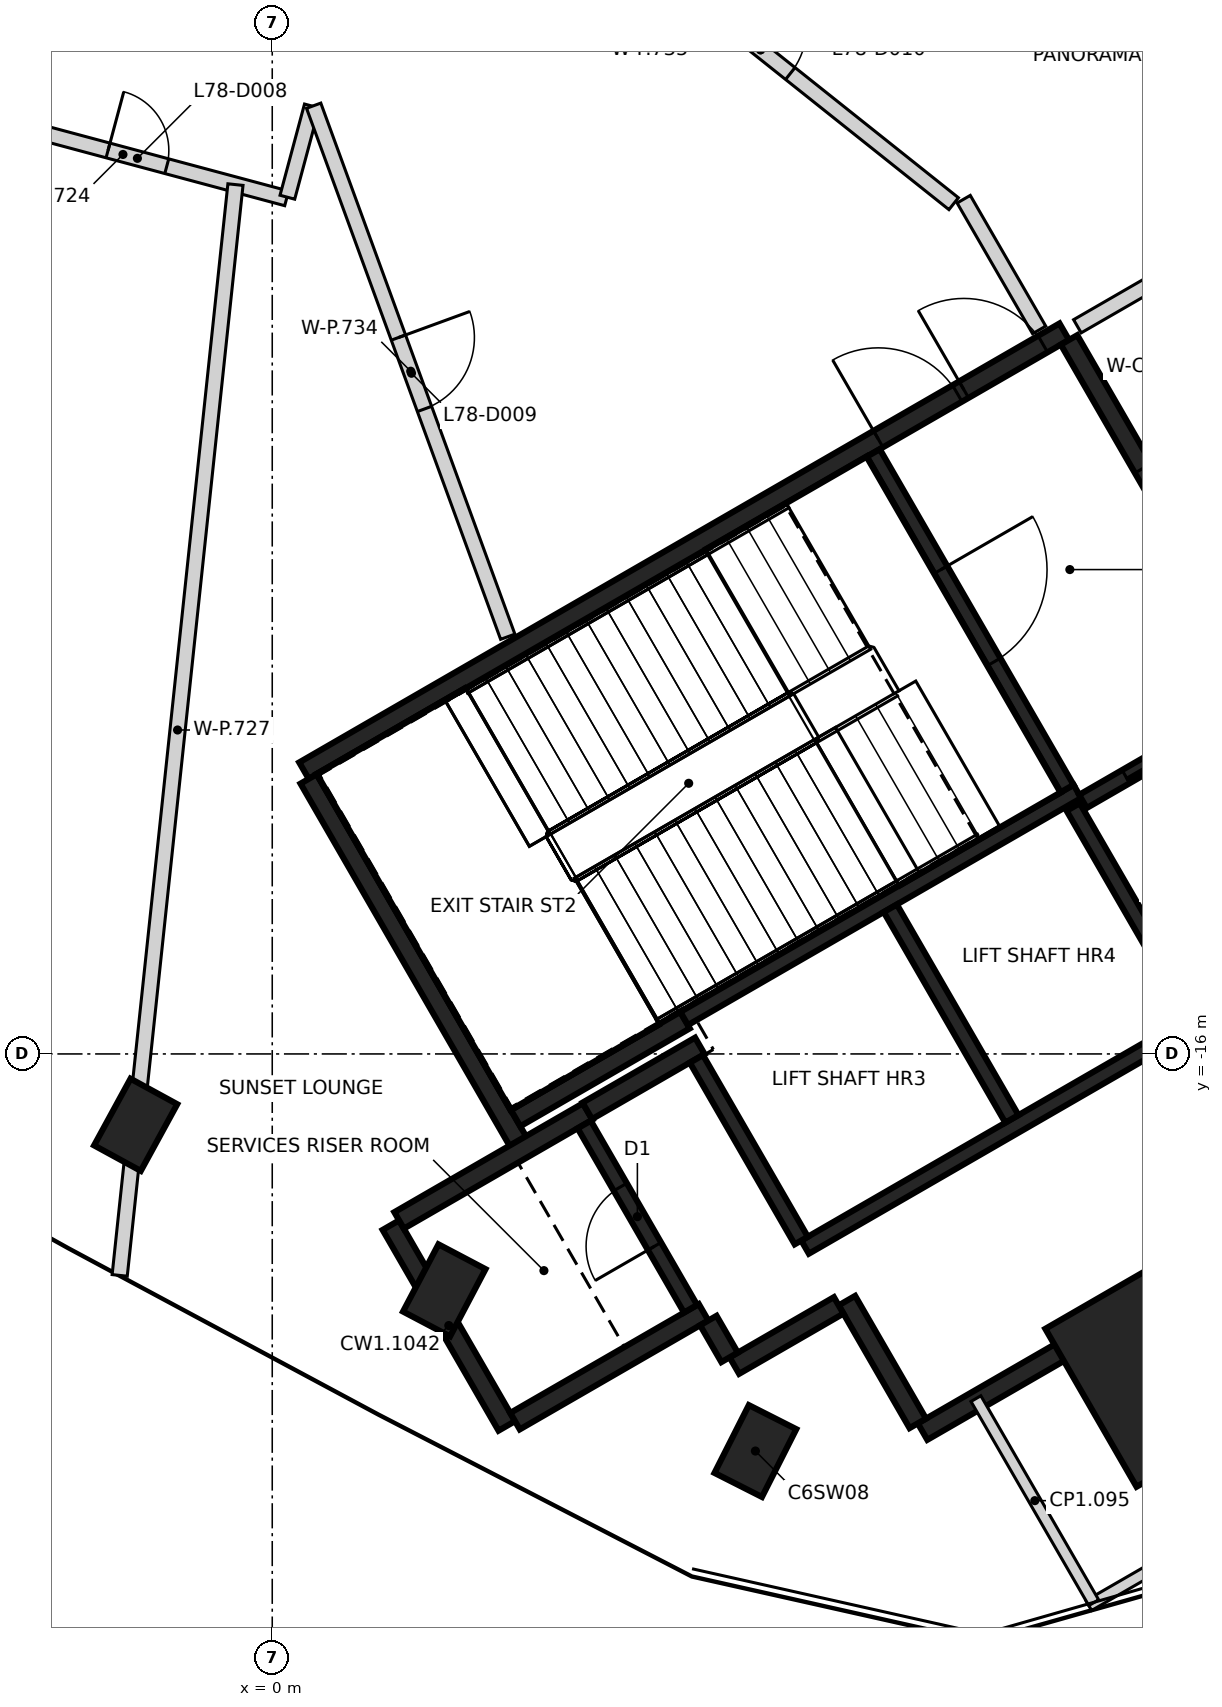
"""IFC4 building model, lengths in metres.
Left out: names, types, materials, properties, quantities, classifications, styles, units other than length and angle.
Written with IfcOpenShell. Run it as: python <this file> out.ifc"""

import sys

from ifc_helpers import new_model, si_unit, direction, frame, frame_2d, origin, origin_2d, place, context, subcontext, project, spatial, rectangle, extrude, element, fill, save


model = new_model("IFC4")
c1 = context("Model", 3, precision=1e-05, world=origin(), true_north=direction((0.0, 1.0)))
c2 = subcontext(c1, "Body", "Model", "MODEL_VIEW")
j1 = project(units=[si_unit("LENGTHUNIT", "METRE"), si_unit("PLANEANGLEUNIT", "RADIAN")], contexts=[c1])
p1 = place(None, origin())
s1 = spatial("IfcSite", under=j1, at=p1, CompositionType="ELEMENT")
p2 = place(p1, origin())
s2 = spatial("IfcBuilding", under=s1, at=p2, CompositionType="ELEMENT")
p3 = place(p2, frame((0.0, 0.0, 312.6)))
s3 = spatial("IfcBuildingStorey", under=s2, at=p3, CompositionType="ELEMENT", Elevation=312.6)
for number, where, z_axis, x_axis in (
    (1, (-1.797, -16.932, -0.35), (0.0, 0.0, 1.0), (0.479, 0.878, 0.0)),
    (2, (2.263, -19.11, -0.35), (0.0, 0.0, 1.0), (0.466, 0.885, 0.0)),
    (3, (6.356, -21.224, -0.35), (0.0, 0.0, 1.0), (0.452, 0.892, 0.0)),
):
    element("IfcColumn", number, at=place(p3, frame(where, z_axis=z_axis, x_axis=x_axis)), inside=s3, PredefinedType="COLUMN", context=c2, shape_type="SweptSolid", body=[
        extrude(rectangle(XDim=1.0, YDim=0.7, at=origin_2d()), origin(), (0.0, 0.0, 1.0), 8.1),
    ])
p4 = place(p3, frame((11.637, -20.155, -0.35), z_axis=(0.0, 0.0, 1.0), x_axis=(-0.5, 0.866025403784, 0.0)))
e4 = element("IfcColumn", 4, at=p4, inside=s3, PredefinedType="COLUMN", context=c2, shape_type="SweptSolid", body=[
    extrude(rectangle(XDim=2.4, YDim=2.0, at=origin_2d()), origin(), (0.0, 0.0, 1.0), 8.1),
])
p5 = place(p3, frame((0.417, -12.273, 0.0), z_axis=(0.0, 0.0, 1.0), x_axis=(0.866021906294, 0.500006057782, 0.0)))
e5 = element("IfcWall", 5, at=p5, inside=s3, PredefinedType="SHEAR", context=c2, shape_type="SweptSolid", body=[
    extrude(rectangle(XDim=11.55, YDim=0.25, at=frame_2d((5.775, 0.0))), origin(), (0.0, 0.0, 1.0), 7.75),
])
p6 = place(p5, frame((10.025, 0.0, 0.0)))
e6 = element("IfcOpeningElement", 6, at=p6, cuts=e5, PredefinedType="OPENING", context=c2, shape_type="SweptSolid", body=[
    extrude(rectangle(XDim=1.2, YDim=2.1, at=frame_2d((0.6, 1.05))), frame((0.0, 0.135, 0.0), z_axis=(0.0, -1.0, 0.0), x_axis=(1.0, 0.0, 0.0)), (0.0, 0.0, 1.0), 0.27),
])
p7 = place(p5, frame((8.725, 0.0, 0.0)))
e7 = element("IfcOpeningElement", 7, at=p7, cuts=e5, PredefinedType="OPENING", context=c2, shape_type="SweptSolid", body=[
    extrude(rectangle(XDim=1.2, YDim=2.1, at=frame_2d((0.6, 1.05))), frame((0.0, 0.135, 0.0), z_axis=(0.0, -1.0, 0.0), x_axis=(1.0, 0.0, 0.0)), (0.0, 0.0, 1.0), 0.27),
])
p8 = place(p3, frame((16.133, -16.594, 0.0), z_axis=(0.0, 0.0, 1.0), x_axis=(-0.866022959057, -0.500004234368, 0.0)))
e8 = element("IfcWall", 8, at=p8, inside=s3, PredefinedType="SHEAR", context=c2, shape_type="SweptSolid", body=[
    extrude(rectangle(XDim=8.75, YDim=0.25, at=frame_2d((4.375, 0.0))), origin(), (0.0, 0.0, 1.0), 7.75),
])
p9 = place(p8, frame((3.425, 0.0, 0.0)))
e9 = element("IfcOpeningElement", 9, at=p9, cuts=e8, PredefinedType="OPENING", context=c2, shape_type="SweptSolid", body=[
    extrude(rectangle(XDim=0.9, YDim=2.1, at=frame_2d((0.45, 1.05))), frame((0.0, 0.135, 0.0), z_axis=(0.0, -1.0, 0.0), x_axis=(1.0, 0.0, 0.0)), (0.0, 0.0, 1.0), 0.27),
])
p10 = place(p3, frame((3.235, -17.153, 0.0), z_axis=(0.0, 0.0, 1.0), x_axis=(-0.500008851346, 0.866020293397, 0.0)))
e10 = element("IfcWall", 10, at=p10, inside=s3, PredefinedType="SHEAR", context=c2, shape_type="SweptSolid", body=[
    extrude(rectangle(XDim=5.51, YDim=0.25, at=frame_2d((2.755, 0.0))), origin(), (0.0, 0.0, 1.0), 7.75),
])
p11 = place(p3, frame((10.483, -6.606, 0.0), z_axis=(0.0, 0.0, 1.0), x_axis=(0.49999885962, -0.866026062182, 0.0)))
e11 = element("IfcWall", 11, at=p11, inside=s3, PredefinedType="SHEAR", context=c2, shape_type="SweptSolid", body=[
    extrude(rectangle(XDim=5.225, YDim=0.25, at=frame_2d((2.612, 0.0))), origin(), (0.0, 0.0, 1.0), 7.75),
])
p12 = place(p11, frame((1.95, 0.0, 0.0)))
e12 = element("IfcOpeningElement", 12, at=p12, cuts=e11, PredefinedType="OPENING", context=c2, shape_type="SweptSolid", body=[
    extrude(rectangle(XDim=1.2, YDim=2.1, at=frame_2d((0.6, 1.05))), frame((0.0, 0.135, 0.0), z_axis=(0.0, -1.0, 0.0), x_axis=(1.0, 0.0, 0.0)), (0.0, 0.0, 1.0), 0.27),
])
p13 = place(p3, frame((3.085, -20.894, 0.0), z_axis=(0.0, 0.0, 1.0), x_axis=(-0.499978833458, 0.866037623948, 0.0)))
e13 = element("IfcWall", 13, at=p13, inside=s3, PredefinedType="SHEAR", context=c2, shape_type="SweptSolid", body=[
    extrude(rectangle(XDim=3.05, YDim=0.25, at=frame_2d((1.525, 0.0))), origin(), (0.0, 0.0, 1.0), 7.75),
])
p14 = place(p3, frame((1.669, -18.19, 0.0), z_axis=(0.0, 0.0, 1.0), x_axis=(0.866042235819, 0.499970844928, 0.0)))
e14 = element("IfcWall", 14, at=p14, inside=s3, PredefinedType="SHEAR", context=c2, shape_type="SweptSolid", body=[
    extrude(rectangle(XDim=2.865, YDim=0.25, at=frame_2d((1.432, 0.0))), origin(), (0.0, 0.0, 1.0), 7.75),
])
p15 = place(p3, frame((5.675, -19.399, 0.0), z_axis=(0.0, 0.0, 1.0), x_axis=(-0.866026637627, -0.499997862916, 0.0)))
e15 = element("IfcWall", 15, at=p15, inside=s3, PredefinedType="SHEAR", context=c2, shape_type="SweptSolid", body=[
    extrude(rectangle(XDim=2.865, YDim=0.25, at=frame_2d((1.432, 0.0))), origin(), (0.0, 0.0, 1.0), 7.75),
])
p16 = place(p3, frame((5.431, -15.556, 0.0), z_axis=(0.0, 0.0, 1.0), x_axis=(-0.866022940537, -0.500004266446, 0.0)))
e16 = element("IfcWall", 16, at=p16, inside=s3, PredefinedType="SHEAR", context=c2, shape_type="SweptSolid", body=[
    extrude(rectangle(XDim=2.575, YDim=0.25, at=frame_2d((1.287, 0.0))), origin(), (0.0, 0.0, 1.0), 7.75),
])
p17 = place(p3, frame((8.493, -20.86, 0.0), z_axis=(0.0, 0.0, 1.0), x_axis=(-0.500039802285, 0.866002422705, 0.0)))
e17 = element("IfcWall", 17, at=p17, inside=s3, PredefinedType="SHEAR", context=c2, shape_type="SweptSolid", body=[
    extrude(rectangle(XDim=1.865, YDim=0.25, at=frame_2d((0.932, 0.0))), origin(), (0.0, 0.0, 1.0), 7.75),
])
p18 = place(p3, frame((4.145, -16.749, 0.0), z_axis=(0.0, 0.0, 1.0), x_axis=(0.866038183914, 0.499977863513, 0.0)))
e18 = element("IfcWall", 18, at=p18, inside=s3, PredefinedType="SHEAR", context=c2, shape_type="SweptSolid", body=[
    extrude(rectangle(XDim=1.71, YDim=0.25, at=frame_2d((0.855, 0.0))), origin(), (0.0, 0.0, 1.0), 7.75),
])
p19 = place(p3, frame((7.452, -19.308, 0.0), z_axis=(0.0, 0.0, 1.0), x_axis=(-0.866044474677, -0.49996696679, 0.0)))
e19 = element("IfcWall", 19, at=p19, inside=s3, PredefinedType="SHEAR", context=c2, shape_type="SweptSolid", body=[
    extrude(rectangle(XDim=1.584, YDim=0.25, at=frame_2d((0.792, 0.0))), origin(), (0.0, 0.0, 1.0), 7.75),
])
p20 = place(p3, frame((6.017, -19.992, 0.0), z_axis=(0.0, 0.0, 1.0), x_axis=(-0.500364886717, 0.865814633822, 0.0)))
e20 = element("IfcWall", 20, at=p20, inside=s3, PredefinedType="SHEAR", context=c2, shape_type="SweptSolid", body=[
    extrude(rectangle(XDim=0.559, YDim=0.25, at=frame_2d((0.28, 0.0))), origin(), (0.0, 0.0, 1.0), 7.75),
])
p21 = place(p3, frame((5.419, -15.534, 0.0), z_axis=(0.0, 0.0, 1.0), x_axis=(0.866029065029, 0.499993658486, 0.0)))
e21 = element("IfcWall", 21, at=p21, inside=s3, PredefinedType="SHEAR", context=c2, shape_type="SweptSolid", body=[
    extrude(rectangle(XDim=5.974, YDim=0.2, at=frame_2d((2.987, 0.0))), origin(), (0.0, 0.0, 1.0), 7.75),
])
p22 = place(p3, frame((7.01, -18.542, 0.0), z_axis=(0.0, 0.0, 1.0), x_axis=(0.866030299012, 0.499991521122, 0.0)))
e22 = element("IfcWall", 22, at=p22, inside=s3, PredefinedType="SHEAR", context=c2, shape_type="SweptSolid", body=[
    extrude(rectangle(XDim=6.1, YDim=0.2, at=frame_2d((3.05, 0.0))), origin(), (0.0, 0.0, 1.0), 7.75),
])
p23 = place(p3, frame((7.906, -8.094, 0.0), z_axis=(0.0, 0.0, 1.0), x_axis=(0.500027839223, -0.866009330205, 0.0)))
e23 = element("IfcWall", 23, at=p23, inside=s3, PredefinedType="SHEAR", context=c2, shape_type="SweptSolid", body=[
    extrude(rectangle(XDim=5.098, YDim=0.2, at=frame_2d((2.549, 0.0))), origin(), (0.0, 0.0, 1.0), 7.75),
])
p24 = place(p23, frame((1.774, 0.0, 0.0)))
e24 = element("IfcOpeningElement", 24, at=p24, cuts=e23, PredefinedType="OPENING", context=c2, shape_type="SweptSolid", body=[
    extrude(rectangle(XDim=1.4, YDim=2.1, at=frame_2d((0.7, 1.05))), frame((0.0, 0.11, 0.0), z_axis=(0.0, -1.0, 0.0), x_axis=(1.0, 0.0, 0.0)), (0.0, 0.0, 1.0), 0.22),
])
p25 = place(p3, frame((8.132, -14.084, 0.0), z_axis=(0.0, 0.0, 1.0), x_axis=(0.499997778408, -0.866026686418, 0.0)))
e25 = element("IfcWall", 25, at=p25, inside=s3, PredefinedType="SHEAR", context=c2, shape_type="SweptSolid", body=[
    extrude(rectangle(XDim=3.198, YDim=0.2, at=frame_2d((1.599, 0.0))), origin(), (0.0, 0.0, 1.0), 7.75),
])
p26 = place(p3, frame((5.503, -19.352, 0.0), z_axis=(0.0, 0.0, 1.0), x_axis=(-0.499986818241, 0.866033014143, 0.0)))
e26 = element("IfcWall", 26, at=p26, inside=s3, PredefinedType="SHEAR", context=c2, shape_type="SweptSolid", body=[
    extrude(rectangle(XDim=2.798, YDim=0.2, at=frame_2d((1.399, 0.0))), origin(), (0.0, 0.0, 1.0), 7.75),
])
p27 = place(p26, frame((0.949, 0.0, 0.0)))
e27 = element("IfcOpeningElement", 27, at=p27, cuts=e26, PredefinedType="OPENING", context=c2, shape_type="SweptSolid", body=[
    extrude(rectangle(XDim=0.9, YDim=2.1, at=frame_2d((0.45, 1.05))), frame((0.0, 0.11, 0.0), z_axis=(0.0, -1.0, 0.0), x_axis=(1.0, 0.0, 0.0)), (0.0, 0.0, 1.0), 0.22),
])
p28 = place(p3, frame((6.96, -18.455, 0.0), z_axis=(0.0, 0.0, 1.0), x_axis=(-0.499926705758, 0.866067716099, 0.0)))
e28 = element("IfcWall", 28, at=p28, inside=s3, PredefinedType="SHEAR", context=c2, shape_type="SweptSolid", body=[
    extrude(rectangle(XDim=2.759, YDim=0.2, at=frame_2d((1.38, 0.0))), origin(), (0.0, 0.0, 1.0), 7.75),
])
p29 = place(p3, frame((12.088, -15.437, 0.0), z_axis=(0.0, 0.0, 1.0), x_axis=(-0.500026960575, 0.86600983753, 0.0)))
e29 = element("IfcWall", 29, at=p29, inside=s3, PredefinedType="SHEAR", context=c2, shape_type="SweptSolid", body=[
    extrude(rectangle(XDim=3.1, YDim=0.2, at=frame_2d((1.55, 0.0))), origin(), (0.0, 0.0, 1.0), 7.75),
])
p30 = place(p3, frame((10.666, -12.678, 0.0), z_axis=(0.0, 0.0, 1.0), x_axis=(0.866018407898, 0.500012117035, 0.0)))
e30 = element("IfcWall", 30, at=p30, inside=s3, PredefinedType="SHEAR", context=c2, shape_type="SweptSolid", body=[
    extrude(rectangle(XDim=2.651, YDim=0.2, at=frame_2d((1.325, 0.0))), origin(), (0.0, 0.0, 1.0), 7.75),
])
p31 = place(p30, frame((0.652, 0.0, 0.0)))
e31 = element("IfcOpeningElement", 31, at=p31, cuts=e30, PredefinedType="OPENING", context=c2, shape_type="SweptSolid", body=[
    extrude(rectangle(XDim=1.3, YDim=2.1, at=frame_2d((0.65, 1.05))), frame((0.0, 0.11, 0.0), z_axis=(0.0, -1.0, 0.0), x_axis=(1.0, 0.0, 0.0)), (0.0, 0.0, 1.0), 0.22),
])
p32 = place(p3, frame((15.896, -20.282, 0.0), z_axis=(0.0, 0.0, 1.0), x_axis=(-0.866017493347, -0.500013701029, 0.0)))
e32 = element("IfcWall", 32, at=p32, inside=s3, PredefinedType="PARTITIONING", context=c2, shape_type="SweptSolid", body=[
    extrude(rectangle(XDim=5.95, YDim=0.15, at=frame_2d((2.975, 0.0))), origin(), (0.0, 0.0, 1.0), 7.75),
])
p33 = place(p3, frame((10.808, -23.219, 0.0), z_axis=(0.0, 0.0, 1.0), x_axis=(-0.500026960575, 0.86600983753, 0.0)))
e33 = element("IfcWall", 33, at=p33, inside=s3, PredefinedType="PARTITIONING", context=c2, shape_type="SweptSolid", body=[
    extrude(rectangle(XDim=3.1, YDim=0.15, at=frame_2d((1.55, 0.0))), origin(), (0.0, 0.0, 1.0), 7.75),
])
p34 = place(p3, frame((10.593, -6.427, 0.0), z_axis=(0.0, 0.0, 1.0), x_axis=(0.866115802186, 0.499843392678, 0.0)))
e34 = element("IfcWall", 34, at=p34, inside=s3, PredefinedType="PARTITIONING", context=c2, shape_type="SweptSolid", body=[
    extrude(rectangle(XDim=1.34, YDim=0.2, at=frame_2d((0.67, 0.0))), origin(), (0.0, 0.0, 1.0), 7.75),
])
p35 = place(p3, frame((-4.118, -3.589, 0.0), z_axis=(0.0, 0.0, 1.0), x_axis=(0.965894280721, -0.258936746079, 0.0)))
e35 = element("IfcWall", 35, at=p35, inside=s3, PredefinedType="PARTITIONING", context=c2, shape_type="SweptSolid", body=[
    extrude(rectangle(XDim=4.46, YDim=0.2, at=frame_2d((2.23, 0.0))), origin(), (0.0, 0.0, 1.0), 7.75),
])
p36 = place(p35, frame((2.027, 0.0, 0.0)))
e36 = element("IfcOpeningElement", 36, at=p36, cuts=e35, PredefinedType="OPENING", context=c2, shape_type="SweptSolid", body=[
    extrude(rectangle(XDim=0.8, YDim=2.1, at=frame_2d((0.4, 1.05))), frame((0.0, 0.11, 0.0), z_axis=(0.0, -1.0, 0.0), x_axis=(1.0, 0.0, 0.0)), (0.0, 0.0, 1.0), 0.22),
])
p37 = place(p3, frame((-2.007, -18.914, 0.0), z_axis=(0.0, 0.0, 1.0), x_axis=(0.105531923802, 0.99441591553, 0.0)))
e37 = element("IfcWall", 37, at=p37, inside=s3, PredefinedType="PARTITIONING", context=c2, shape_type="SweptSolid", body=[
    extrude(rectangle(XDim=14.431, YDim=0.2, at=frame_2d((7.216, 0.0))), origin(), (0.0, 0.0, 1.0), 7.75),
])
p38 = place(p3, frame((0.199, -4.729, 0.0), z_axis=(0.0, 0.0, 1.0), x_axis=(0.259191159513, 0.965826041702, 0.0)))
e38 = element("IfcWall", 38, at=p38, inside=s3, PredefinedType="PARTITIONING", context=c2, shape_type="SweptSolid", body=[
    extrude(rectangle(XDim=1.242, YDim=0.2, at=frame_2d((0.621, 0.0))), origin(), (0.0, 0.0, 1.0), 7.75),
])
p39 = place(p3, frame((0.545, -3.525, 0.0), z_axis=(0.0, 0.0, 1.0), x_axis=(0.343284274362, -0.93923155131, 0.0)))
e39 = element("IfcWall", 39, at=p39, inside=s3, PredefinedType="PARTITIONING", context=c2, shape_type="SweptSolid", body=[
    extrude(rectangle(XDim=7.438, YDim=0.2, at=frame_2d((3.719, 0.0))), origin(), (0.0, 0.0, 1.0), 7.75),
])
p40 = place(p39, frame((3.248, 0.0, 0.0)))
e40 = element("IfcOpeningElement", 40, at=p40, cuts=e39, PredefinedType="OPENING", context=c2, shape_type="SweptSolid", body=[
    extrude(rectangle(XDim=1.0, YDim=2.1, at=frame_2d((0.5, 1.05))), frame((0.0, 0.11, 0.0), z_axis=(0.0, -1.0, 0.0), x_axis=(1.0, 0.0, 0.0)), (0.0, 0.0, 1.0), 0.22),
])
p41 = place(p3, frame((3.884, -0.766, 0.0), z_axis=(0.0, 0.0, 1.0), x_axis=(0.782143113399, -0.623098828568, 0.0)))
e41 = element("IfcWall", 41, at=p41, inside=s3, PredefinedType="PARTITIONING", context=c2, shape_type="SweptSolid", body=[
    extrude(rectangle(XDim=6.496, YDim=0.2, at=frame_2d((3.248, 0.0))), origin(), (0.0, 0.0, 1.0), 7.75),
])
p42 = place(p41, frame((2.748, 0.0, 0.0)))
e42 = element("IfcOpeningElement", 42, at=p42, cuts=e41, PredefinedType="OPENING", context=c2, shape_type="SweptSolid", body=[
    extrude(rectangle(XDim=1.0, YDim=2.1, at=frame_2d((0.5, 1.05))), frame((0.0, 0.11, 0.0), z_axis=(0.0, -1.0, 0.0), x_axis=(1.0, 0.0, 0.0)), (0.0, 0.0, 1.0), 0.22),
])
p43 = place(p3, frame((9.097, -4.755, 0.0), z_axis=(0.0, 0.0, 1.0), x_axis=(0.499867898641, -0.866101659107, 0.0)))
e43 = element("IfcWall", 43, at=p43, inside=s3, PredefinedType="PARTITIONING", context=c2, shape_type="SweptSolid", body=[
    extrude(rectangle(XDim=1.986, YDim=0.2, at=frame_2d((0.993, 0.0))), origin(), (0.0, 0.0, 1.0), 7.75),
])
p44 = place(p31, origin())
e44 = element("IfcDoor", 44, at=p44, inside=s3, OperationType="SLIDING_TO_LEFT", PredefinedType="DOOR", context=c2, shape_type="SweptSolid", body=[
    extrude(rectangle(XDim=1.3, YDim=2.1, at=frame_2d((0.65, 1.05))), frame((0.0, 0.025, 0.0), z_axis=(0.0, -1.0, 0.0), x_axis=(1.0, 0.0, 0.0)), (0.0, 0.0, 1.0), 0.05),
])
fill(e31, e44)
p45 = place(p6, origin())
e45 = element("IfcDoor", 45, at=p45, inside=s3, OperationType="SINGLE_SWING_LEFT", PredefinedType="DOOR", context=c2, shape_type="SweptSolid", body=[
    extrude(rectangle(XDim=1.2, YDim=2.1, at=frame_2d((0.6, 1.05))), frame((0.0, 0.025, 0.0), z_axis=(0.0, -1.0, 0.0), x_axis=(1.0, 0.0, 0.0)), (0.0, 0.0, 1.0), 0.05),
])
fill(e6, e45)
p46 = place(p7, origin())
e46 = element("IfcDoor", 46, at=p46, inside=s3, OperationType="SINGLE_SWING_RIGHT", PredefinedType="DOOR", context=c2, shape_type="SweptSolid", body=[
    extrude(rectangle(XDim=1.2, YDim=2.1, at=frame_2d((0.6, 1.05))), frame((0.0, 0.025, 0.0), z_axis=(0.0, -1.0, 0.0), x_axis=(1.0, 0.0, 0.0)), (0.0, 0.0, 1.0), 0.05),
])
fill(e7, e46)
p47 = place(p12, origin())
e47 = element("IfcDoor", 47, at=p47, inside=s3, OperationType="SINGLE_SWING_LEFT", PredefinedType="DOOR", context=c2, shape_type="SweptSolid", body=[
    extrude(rectangle(XDim=1.2, YDim=2.1, at=frame_2d((0.6, 1.05))), frame((0.0, 0.025, 0.0), z_axis=(0.0, -1.0, 0.0), x_axis=(1.0, 0.0, 0.0)), (0.0, 0.0, 1.0), 0.05),
])
fill(e12, e47)
p48 = place(p24, origin())
e48 = element("IfcDoor", 48, at=p48, inside=s3, OperationType="SINGLE_SWING_RIGHT", PredefinedType="DOOR", context=c2, shape_type="SweptSolid", body=[
    extrude(rectangle(XDim=1.4, YDim=2.1, at=frame_2d((0.7, 1.05))), frame((0.0, 0.025, 0.0), z_axis=(0.0, -1.0, 0.0), x_axis=(1.0, 0.0, 0.0)), (0.0, 0.0, 1.0), 0.05),
])
fill(e24, e48)
p49 = place(p27, origin())
e49 = element("IfcDoor", 49, at=p49, inside=s3, OperationType="SINGLE_SWING_LEFT", PredefinedType="DOOR", context=c2, shape_type="SweptSolid", body=[
    extrude(rectangle(XDim=0.9, YDim=2.1, at=frame_2d((0.45, 1.05))), frame((0.0, 0.025, 0.0), z_axis=(0.0, -1.0, 0.0), x_axis=(1.0, 0.0, 0.0)), (0.0, 0.0, 1.0), 0.05),
])
fill(e27, e49)
p50 = place(p36, frame((0.8, 0.0, 0.0), z_axis=(0.0, 0.0, 1.0), x_axis=(-1.0, 0.0, 0.0)))
e50 = element("IfcDoor", 50, at=p50, inside=s3, OperationType="SINGLE_SWING_LEFT", PredefinedType="DOOR", context=c2, shape_type="SweptSolid", body=[
    extrude(rectangle(XDim=0.8, YDim=2.1, at=frame_2d((0.4, 1.05))), frame((0.0, 0.025, 0.0), z_axis=(0.0, -1.0, 0.0), x_axis=(1.0, 0.0, 0.0)), (0.0, 0.0, 1.0), 0.05),
])
fill(e36, e50)
p51 = place(p40, frame((1.0, 0.0, 0.0), z_axis=(0.0, 0.0, 1.0), x_axis=(-1.0, 0.0, 0.0)))
e51 = element("IfcDoor", 51, at=p51, inside=s3, OperationType="SINGLE_SWING_LEFT", PredefinedType="DOOR", context=c2, shape_type="SweptSolid", body=[
    extrude(rectangle(XDim=1.0, YDim=2.1, at=frame_2d((0.5, 1.05))), frame((0.0, 0.025, 0.0), z_axis=(0.0, -1.0, 0.0), x_axis=(1.0, 0.0, 0.0)), (0.0, 0.0, 1.0), 0.05),
])
fill(e40, e51)
p52 = place(p42, origin())
e52 = element("IfcDoor", 52, at=p52, inside=s3, OperationType="SINGLE_SWING_LEFT", PredefinedType="DOOR", context=c2, shape_type="SweptSolid", body=[
    extrude(rectangle(XDim=1.0, YDim=2.1, at=frame_2d((0.5, 1.05))), frame((0.0, 0.025, 0.0), z_axis=(0.0, -1.0, 0.0), x_axis=(1.0, 0.0, 0.0)), (0.0, 0.0, 1.0), 0.05),
])
fill(e42, e52)
save(model, sys.argv[1])
